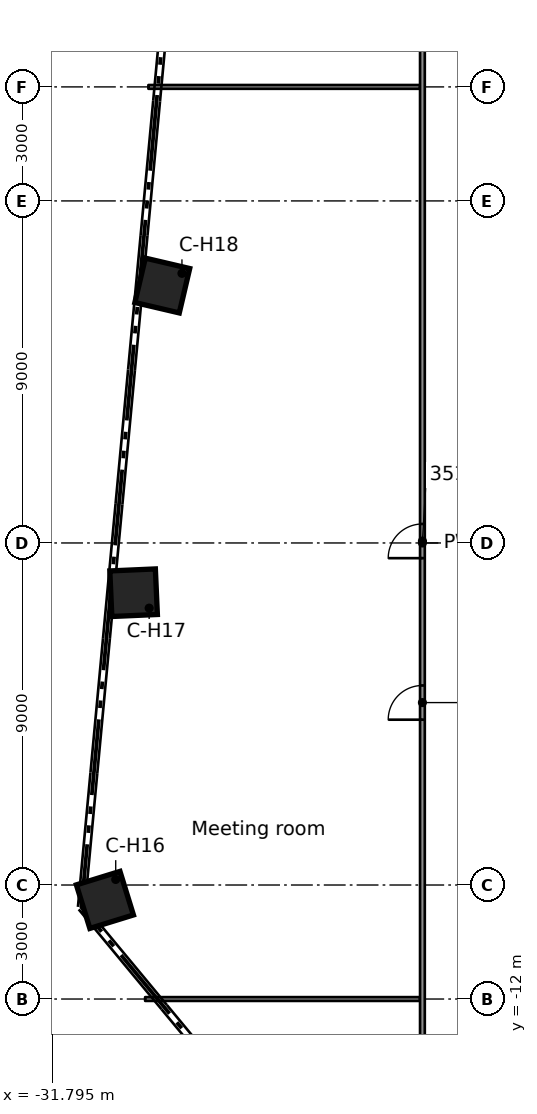
"""IFC4 building model, lengths in metres.
Left out: names, types, materials, properties, quantities, classifications, styles, units other than length and angle.
Written with IfcOpenShell. Run it as: python <this file> out.ifc"""

import sys

from ifc_helpers import new_model, si_unit, direction, frame, frame_2d, origin, origin_2d, place, context, subcontext, project, spatial, rectangle, extrude, element, fill, save


model = new_model("IFC4")
c1 = context("Model", 3, precision=1e-05, world=origin(), true_north=direction((0.0, 1.0)))
c2 = subcontext(c1, "Body", "Model", "MODEL_VIEW")
j1 = project(units=[si_unit("LENGTHUNIT", "METRE"), si_unit("PLANEANGLEUNIT", "RADIAN")], contexts=[c1])
p1 = place(None, origin())
s1 = spatial("IfcSite", under=j1, at=p1, CompositionType="ELEMENT")
p2 = place(p1, origin())
s2 = spatial("IfcBuilding", under=s1, at=p2, CompositionType="ELEMENT")
p3 = place(p2, frame((0.0, 0.0, 170.6)))
s3 = spatial("IfcBuildingStorey", under=s2, at=p3, CompositionType="ELEMENT", Elevation=170.6)
for number, where, z_axis, x_axis in (
    (1, (-30.405, -9.392, 0.0), (0.0, 0.0, 1.0), (-0.955, -0.295, 0.0)),
    (2, (-29.65, -1.309, 0.0), (0.0, 0.0, 1.0), (-0.999, -0.044, 0.0)),
    (3, (-28.895, 6.774, 0.0), (0.0, 0.0, 1.0), (-0.974, 0.228, 0.0)),
):
    element("IfcColumn", number, at=place(p3, frame(where, z_axis=z_axis, x_axis=x_axis)), inside=s3, PredefinedType="COLUMN", context=c2, shape_type="SweptSolid", body=[
        extrude(rectangle(XDim=1.2, YDim=1.2, at=origin_2d()), origin(), (0.0, 0.0, 1.0), 3.5),
    ])
p4 = place(p3, frame((-29.347, -12.0, 0.0), z_axis=(0.0, 0.0, 1.0), x_axis=(1.0, 0.0, 0.0)))
e4 = element("IfcWall", 4, at=p4, inside=s3, PredefinedType="PARTITIONING", context=c2, shape_type="SweptSolid", body=[
    extrude(rectangle(XDim=7.234, YDim=0.1, at=frame_2d((3.617, 0.0))), origin(), (0.0, 0.0, 1.0), 3.06),
])
p5 = place(p3, frame((-29.261, 12.0, 0.0), z_axis=(0.0, 0.0, 1.0), x_axis=(1.0, 0.0, 0.0)))
e5 = element("IfcWall", 5, at=p5, inside=s3, PredefinedType="PARTITIONING", context=c2, shape_type="SweptSolid", body=[
    extrude(rectangle(XDim=7.148, YDim=0.1, at=frame_2d((3.574, 0.0))), origin(), (0.0, 0.0, 1.0), 3.06),
])
p6 = place(p3, frame((-22.05, -15.051, 0.0), z_axis=(0.0, 0.0, 1.0), x_axis=(0.0, 1.0, 0.0)))
e6 = element("IfcWall", 6, at=p6, inside=s3, PredefinedType="PARTITIONING", context=c2, shape_type="SweptSolid", body=[
    extrude(rectangle(XDim=30.102, YDim=0.125, at=frame_2d((15.051, 0.0))), origin(), (0.0, 0.0, 1.0), 3.06),
])
p7 = place(p6, frame((10.401, 0.0, 0.0)))
e7 = element("IfcOpeningElement", 7, at=p7, cuts=e6, PredefinedType="OPENING", context=c2, shape_type="SweptSolid", body=[
    extrude(rectangle(XDim=0.9, YDim=2.1, at=frame_2d((0.45, 1.05))), frame((0.0, 0.073, 0.0), z_axis=(0.0, -1.0, 0.0), x_axis=(1.0, 0.0, 0.0)), (0.0, 0.0, 1.0), 0.145),
])
p8 = place(p6, frame((14.651, 0.0, 0.0)))
e8 = element("IfcOpeningElement", 8, at=p8, cuts=e6, PredefinedType="OPENING", context=c2, shape_type="SweptSolid", body=[
    extrude(rectangle(XDim=0.9, YDim=2.1, at=frame_2d((0.45, 1.05))), frame((0.0, 0.073, 0.0), z_axis=(0.0, -1.0, 0.0), x_axis=(1.0, 0.0, 0.0)), (0.0, 0.0, 1.0), 0.145),
])
p9 = place(p6, frame((1.1, 0.0, 0.0)))
e9 = element("IfcOpeningElement", 9, at=p9, cuts=e6, PredefinedType="OPENING", context=c2, shape_type="SweptSolid", body=[
    extrude(rectangle(XDim=0.9, YDim=2.1, at=frame_2d((0.45, 1.05))), frame((0.0, 0.073, 0.0), z_axis=(0.0, -1.0, 0.0), x_axis=(1.0, 0.0, 0.0)), (0.0, 0.0, 1.0), 0.145),
])
p10 = place(p7, origin())
e10 = element("IfcDoor", 10, at=p10, inside=s3, OperationType="SINGLE_SWING_LEFT", PredefinedType="DOOR", context=c2, shape_type="SweptSolid", body=[
    extrude(rectangle(XDim=0.9, YDim=2.1, at=frame_2d((0.45, 1.05))), frame((0.0, 0.025, 0.0), z_axis=(0.0, -1.0, 0.0), x_axis=(1.0, 0.0, 0.0)), (0.0, 0.0, 1.0), 0.05),
])
fill(e7, e10)
p11 = place(p8, origin())
e11 = element("IfcDoor", 11, at=p11, inside=s3, OperationType="SINGLE_SWING_RIGHT", PredefinedType="DOOR", context=c2, shape_type="SweptSolid", body=[
    extrude(rectangle(XDim=0.9, YDim=2.1, at=frame_2d((0.45, 1.05))), frame((0.0, 0.025, 0.0), z_axis=(0.0, -1.0, 0.0), x_axis=(1.0, 0.0, 0.0)), (0.0, 0.0, 1.0), 0.05),
])
fill(e8, e11)
save(model, sys.argv[1])
